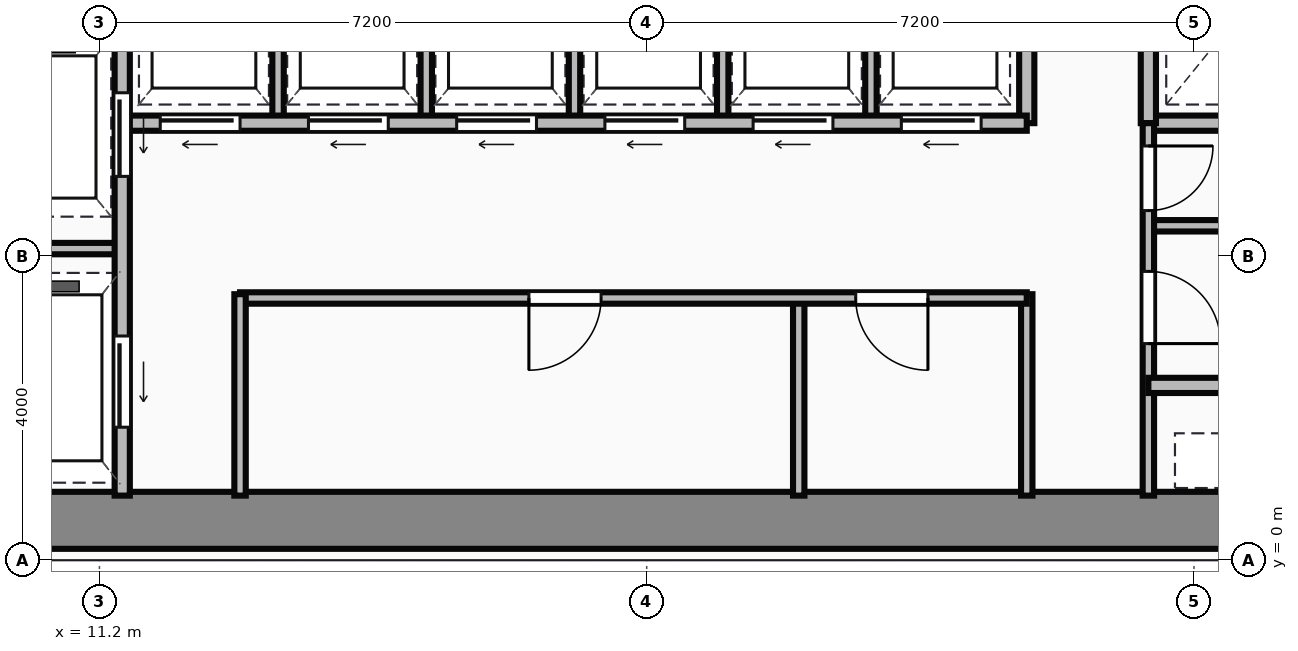
"""IFC4 building model, lengths in metres.
Left out: names, types, materials, properties, quantities, classifications, styles, units other than length and angle.
Written with IfcOpenShell. Run it as: python <this file> out.ifc"""

import sys

from ifc_helpers import new_model, si_unit, direction, frame, frame_2d, origin, place, context, subcontext, project, spatial, rectangle, extrude, source, transform, mapped, element, fill, save


model = new_model("IFC4")
c1 = context("Model", 3, precision=1e-05, world=origin(), true_north=direction((0.0, 1.0)))
c2 = subcontext(c1, "Body", "Model", "MODEL_VIEW")
j1 = project(units=[si_unit("LENGTHUNIT", "METRE"), si_unit("PLANEANGLEUNIT", "RADIAN")], contexts=[c1])
p1 = place(None, origin())
s1 = spatial("IfcSite", under=j1, at=p1, CompositionType="ELEMENT")
p2 = place(p1, origin())
s2 = spatial("IfcBuilding", under=s1, at=p2, CompositionType="ELEMENT")
p3 = place(p2, frame((0.0, 0.0, 121.5)))
s3 = spatial("IfcBuildingStorey", under=s2, at=p3, CompositionType="ELEMENT", Elevation=121.5)
m1 = source(origin(), c2, "Body", "SweptSolid", [
    extrude(rectangle(XDim=29.5, YDim=0.75, at=frame_2d((14.75, 0.0))), origin(), (0.0, 0.0, 1.0), 3.65),
])
p4 = place(p3, frame((4.5, 0.525, 0.0), z_axis=(0.0, 0.0, 1.0), x_axis=(1.0, 0.0, 0.0)))
e1 = element("IfcWall", 1, at=p4, inside=s3, PredefinedType="SHEAR", context=c2, shape_type="MappedRepresentation", body=[
    mapped(m1, transform((0.0, 0.0, 0.0))),
])
m2 = source(origin(), c2, "Body", "SweptSolid", [
    extrude(rectangle(XDim=9.6, YDim=0.2, at=frame_2d((4.8, 0.0))), origin(), (0.0, 0.0, 1.0), 3.4),
])
p5 = place(p3, frame((11.5, 0.85, 0.0), z_axis=(0.0, 0.0, 1.0), x_axis=(0.0, 1.0, 0.0)))
e2 = element("IfcWall", 2, at=p5, inside=s3, PredefinedType="PARTITIONING", context=c2, shape_type="MappedRepresentation", body=[
    mapped(m2, transform((0.0, 0.0, 0.0))),
])
p6 = place(p5, frame((4.2, 0.0, 0.0)))
e3 = element("IfcOpeningElement", 3, at=p6, cuts=e2, PredefinedType="OPENING", context=c2, shape_type="SweptSolid", body=[
    extrude(rectangle(XDim=1.1, YDim=2.15, at=frame_2d((0.55, 1.075))), frame((0.0, 0.11, 0.0), z_axis=(0.0, -1.0, 0.0), x_axis=(1.0, 0.0, 0.0)), (0.0, 0.0, 1.0), 0.22),
])
p7 = place(p5, frame((0.9, 0.0, 0.0)))
e4 = element("IfcOpeningElement", 4, at=p7, cuts=e2, PredefinedType="OPENING", context=c2, shape_type="SweptSolid", body=[
    extrude(rectangle(XDim=1.2, YDim=2.15, at=frame_2d((0.6, 1.075))), frame((0.0, 0.11, 0.0), z_axis=(0.0, -1.0, 0.0), x_axis=(1.0, 0.0, 0.0)), (0.0, 0.0, 1.0), 0.22),
])
m3 = source(origin(), c2, "Body", "SweptSolid", [
    extrude(rectangle(XDim=2.4, YDim=0.15, at=frame_2d((1.2, 0.0))), origin(), (0.0, 0.0, 1.0), 3.4),
])
p8 = place(p3, frame((9.1, 4.1, 0.0), z_axis=(0.0, 0.0, 1.0), x_axis=(1.0, 0.0, 0.0)))
e5 = element("IfcWall", 5, at=p8, inside=s3, PredefinedType="PARTITIONING", context=c2, shape_type="MappedRepresentation", body=[
    mapped(m3, transform((0.0, 0.0, 0.0))),
])
m4 = source(origin(), c2, "Body", "SweptSolid", [
    extrude(rectangle(XDim=2.65, YDim=0.15, at=frame_2d((1.325, 0.0))), origin(), (0.0, 0.0, 1.0), 3.4),
])
p9 = place(p3, frame((13.05, 0.85, 0.0), z_axis=(0.0, 0.0, 1.0), x_axis=(0.0, 1.0, 0.0)))
e6 = element("IfcWall", 6, at=p9, inside=s3, PredefinedType="PARTITIONING", context=c2, shape_type="MappedRepresentation", body=[
    mapped(m4, transform((0.0, 0.0, 0.0))),
])
m5 = source(origin(), c2, "Body", "SweptSolid", [
    extrude(rectangle(XDim=10.35, YDim=0.15, at=frame_2d((5.175, 0.0))), origin(), (0.0, 0.0, 1.0), 3.4),
])
p10 = place(p3, frame((13.05, 3.45, 0.0), z_axis=(0.0, 0.0, 1.0), x_axis=(1.0, 0.0, 0.0)))
e7 = element("IfcWall", 7, at=p10, inside=s3, PredefinedType="PARTITIONING", context=c2, shape_type="MappedRepresentation", body=[
    mapped(m5, transform((0.0, 0.0, 0.0))),
])
p11 = place(p10, frame((3.8, 0.0, 0.0)))
e8 = element("IfcOpeningElement", 8, at=p11, cuts=e7, PredefinedType="OPENING", context=c2, shape_type="SweptSolid", body=[
    extrude(rectangle(XDim=0.95, YDim=2.15, at=frame_2d((0.475, 1.075))), frame((0.0, 0.085, 0.0), z_axis=(0.0, -1.0, 0.0), x_axis=(1.0, 0.0, 0.0)), (0.0, 0.0, 1.0), 0.17),
])
p12 = place(p10, frame((8.1, 0.0, 0.0)))
e9 = element("IfcOpeningElement", 9, at=p12, cuts=e7, PredefinedType="OPENING", context=c2, shape_type="SweptSolid", body=[
    extrude(rectangle(XDim=0.95, YDim=2.15, at=frame_2d((0.475, 1.075))), frame((0.0, 0.085, 0.0), z_axis=(0.0, -1.0, 0.0), x_axis=(1.0, 0.0, 0.0)), (0.0, 0.0, 1.0), 0.17),
])
p13 = place(p3, frame((23.4, 0.85, 0.0), z_axis=(0.0, 0.0, 1.0), x_axis=(0.0, 1.0, 0.0)))
e10 = element("IfcWall", 10, at=p13, inside=s3, PredefinedType="PARTITIONING", context=c2, shape_type="MappedRepresentation", body=[
    mapped(m4, transform((0.0, 0.0, 0.0))),
])
m6 = source(origin(), c2, "Body", "SweptSolid", [
    extrude(rectangle(XDim=2.6, YDim=0.15, at=frame_2d((1.3, 0.0))), origin(), (0.0, 0.0, 1.0), 3.4),
])
p14 = place(p3, frame((20.4, 0.85, 0.0), z_axis=(0.0, 0.0, 1.0), x_axis=(0.0, 1.0, 0.0)))
e11 = element("IfcWall", 11, at=p14, inside=s3, PredefinedType="PARTITIONING", context=c2, shape_type="MappedRepresentation", body=[
    mapped(m6, transform((0.0, 0.0, 0.0))),
])
m7 = source(origin(), c2, "Body", "SweptSolid", [
    extrude(rectangle(XDim=11.85, YDim=0.2, at=frame_2d((5.925, 0.0))), origin(), (0.0, 0.0, 1.0), 3.4),
])
p15 = place(p3, frame((11.55, 5.75, 0.0), z_axis=(0.0, 0.0, 1.0), x_axis=(1.0, 0.0, 0.0)))
e12 = element("IfcWall", 12, at=p15, inside=s3, PredefinedType="PARTITIONING", context=c2, shape_type="MappedRepresentation", body=[
    mapped(m7, transform((0.0, 0.0, 0.0))),
])
p16 = place(p15, frame((0.45, 0.0, 0.0)))
e13 = element("IfcOpeningElement", 13, at=p16, cuts=e12, PredefinedType="OPENING", context=c2, shape_type="SweptSolid", body=[
    extrude(rectangle(XDim=1.05, YDim=2.15, at=frame_2d((0.525, 1.075))), frame((0.0, 0.11, 0.0), z_axis=(0.0, -1.0, 0.0), x_axis=(1.0, 0.0, 0.0)), (0.0, 0.0, 1.0), 0.22),
])
p17 = place(p15, frame((2.4, 0.0, 0.0)))
e14 = element("IfcOpeningElement", 14, at=p17, cuts=e12, PredefinedType="OPENING", context=c2, shape_type="SweptSolid", body=[
    extrude(rectangle(XDim=1.05, YDim=2.15, at=frame_2d((0.525, 1.075))), frame((0.0, 0.11, 0.0), z_axis=(0.0, -1.0, 0.0), x_axis=(1.0, 0.0, 0.0)), (0.0, 0.0, 1.0), 0.22),
])
p18 = place(p15, frame((4.35, 0.0, 0.0)))
e15 = element("IfcOpeningElement", 15, at=p18, cuts=e12, PredefinedType="OPENING", context=c2, shape_type="SweptSolid", body=[
    extrude(rectangle(XDim=1.05, YDim=2.15, at=frame_2d((0.525, 1.075))), frame((0.0, 0.11, 0.0), z_axis=(0.0, -1.0, 0.0), x_axis=(1.0, 0.0, 0.0)), (0.0, 0.0, 1.0), 0.22),
])
p19 = place(p15, frame((6.3, 0.0, 0.0)))
e16 = element("IfcOpeningElement", 16, at=p19, cuts=e12, PredefinedType="OPENING", context=c2, shape_type="SweptSolid", body=[
    extrude(rectangle(XDim=1.05, YDim=2.15, at=frame_2d((0.525, 1.075))), frame((0.0, 0.11, 0.0), z_axis=(0.0, -1.0, 0.0), x_axis=(1.0, 0.0, 0.0)), (0.0, 0.0, 1.0), 0.22),
])
p20 = place(p15, frame((8.25, 0.0, 0.0)))
e17 = element("IfcOpeningElement", 17, at=p20, cuts=e12, PredefinedType="OPENING", context=c2, shape_type="SweptSolid", body=[
    extrude(rectangle(XDim=1.05, YDim=2.15, at=frame_2d((0.525, 1.075))), frame((0.0, 0.11, 0.0), z_axis=(0.0, -1.0, 0.0), x_axis=(1.0, 0.0, 0.0)), (0.0, 0.0, 1.0), 0.22),
])
p21 = place(p15, frame((10.2, 0.0, 0.0)))
e18 = element("IfcOpeningElement", 18, at=p21, cuts=e12, PredefinedType="OPENING", context=c2, shape_type="SweptSolid", body=[
    extrude(rectangle(XDim=1.05, YDim=2.15, at=frame_2d((0.525, 1.075))), frame((0.0, 0.11, 0.0), z_axis=(0.0, -1.0, 0.0), x_axis=(1.0, 0.0, 0.0)), (0.0, 0.0, 1.0), 0.22),
])
m8 = source(origin(), c2, "Body", "SweptSolid", [
    extrude(rectangle(XDim=2.6, YDim=0.2, at=frame_2d((1.3, 0.0))), origin(), (0.0, 0.0, 1.0), 3.4),
])
p22 = place(p3, frame((23.4, 5.75, 0.0), z_axis=(0.0, 0.0, 1.0), x_axis=(0.0, 1.0, 0.0)))
e19 = element("IfcWall", 19, at=p22, inside=s3, PredefinedType="PARTITIONING", context=c2, shape_type="MappedRepresentation", body=[
    mapped(m8, transform((0.0, 0.0, 0.0))),
])
m9 = source(origin(), c2, "Body", "SweptSolid", [
    extrude(rectangle(XDim=2.5, YDim=0.15, at=frame_2d((1.25, 0.0))), origin(), (0.0, 0.0, 1.0), 3.4),
])
for number, where, z_axis, x_axis in (
    (20, (13.55, 5.8, 0.0), (0.0, 0.0, 1.0), (0.0, 1.0, 0.0)),
    (21, (15.5, 5.8, 0.0), (0.0, 0.0, 1.0), (0.0, 1.0, 0.0)),
    (22, (17.45, 5.8, 0.0), (0.0, 0.0, 1.0), (0.0, 1.0, 0.0)),
    (23, (19.4, 5.8, 0.0), (0.0, 0.0, 1.0), (0.0, 1.0, 0.0)),
    (24, (21.35, 5.8, 0.0), (0.0, 0.0, 1.0), (0.0, 1.0, 0.0)),
):
    element("IfcWall", number, at=place(p3, frame(where, z_axis=z_axis, x_axis=x_axis)), inside=s3, PredefinedType="PARTITIONING", context=c2, shape_type="MappedRepresentation", body=[
        mapped(m9, transform((0.0, 0.0, 0.0))),
    ])
m10 = source(origin(), c2, "Body", "SweptSolid", [
    extrude(rectangle(XDim=4.55, YDim=0.2, at=frame_2d((2.275, 0.0))), origin(), (0.0, 0.0, 1.0), 3.4),
])
p23 = place(p3, frame((25.0, 5.75, 0.0), z_axis=(0.0, 0.0, 1.0), x_axis=(1.0, 0.0, 0.0)))
e25 = element("IfcWall", 25, at=p23, inside=s3, PredefinedType="PARTITIONING", context=c2, shape_type="MappedRepresentation", body=[
    mapped(m10, transform((0.0, 0.0, 0.0))),
])
p24 = place(p3, frame((25.0, 5.75, 0.0), z_axis=(0.0, 0.0, 1.0), x_axis=(0.0, 1.0, 0.0)))
e26 = element("IfcWall", 26, at=p24, inside=s3, PredefinedType="PARTITIONING", context=c2, shape_type="MappedRepresentation", body=[
    mapped(m8, transform((0.0, 0.0, 0.0))),
])
m11 = source(origin(), c2, "Body", "SweptSolid", [
    extrude(rectangle(XDim=4.9, YDim=0.15, at=frame_2d((2.45, 0.0))), origin(), (0.0, 0.0, 1.0), 3.4),
])
p25 = place(p3, frame((25.0, 0.85, 0.0), z_axis=(0.0, 0.0, 1.0), x_axis=(0.0, 1.0, 0.0)))
e27 = element("IfcWall", 27, at=p25, inside=s3, PredefinedType="PARTITIONING", context=c2, shape_type="MappedRepresentation", body=[
    mapped(m11, transform((0.0, 0.0, 0.0))),
])
p26 = place(p25, frame((2.0, 0.0, 0.0)))
e28 = element("IfcOpeningElement", 28, at=p26, cuts=e27, PredefinedType="OPENING", context=c2, shape_type="SweptSolid", body=[
    extrude(rectangle(XDim=0.95, YDim=2.15, at=frame_2d((0.475, 1.075))), frame((0.0, 0.085, 0.0), z_axis=(0.0, -1.0, 0.0), x_axis=(1.0, 0.0, 0.0)), (0.0, 0.0, 1.0), 0.17),
])
p27 = place(p25, frame((3.75, 0.0, 0.0)))
e29 = element("IfcOpeningElement", 29, at=p27, cuts=e27, PredefinedType="OPENING", context=c2, shape_type="SweptSolid", body=[
    extrude(rectangle(XDim=0.85, YDim=2.15, at=frame_2d((0.425, 1.075))), frame((0.0, 0.085, 0.0), z_axis=(0.0, -1.0, 0.0), x_axis=(1.0, 0.0, 0.0)), (0.0, 0.0, 1.0), 0.17),
])
m12 = source(origin(), c2, "Body", "SweptSolid", [
    extrude(rectangle(XDim=2.4, YDim=0.2, at=frame_2d((1.2, 0.0))), origin(), (0.0, 0.0, 1.0), 3.4),
])
p28 = place(p3, frame((25.0, 2.3, 0.0), z_axis=(0.0, 0.0, 1.0), x_axis=(1.0, 0.0, 0.0)))
e30 = element("IfcWall", 30, at=p28, inside=s3, PredefinedType="PARTITIONING", context=c2, shape_type="MappedRepresentation", body=[
    mapped(m12, transform((0.0, 0.0, 0.0))),
])
m13 = source(origin(), c2, "Body", "SweptSolid", [
    extrude(rectangle(XDim=4.55, YDim=0.15, at=frame_2d((2.275, 0.0))), origin(), (0.0, 0.0, 1.0), 3.4),
])
p29 = place(p3, frame((25.0, 4.4, 0.0), z_axis=(0.0, 0.0, 1.0), x_axis=(1.0, 0.0, 0.0)))
e31 = element("IfcWall", 31, at=p29, inside=s3, PredefinedType="PARTITIONING", context=c2, shape_type="MappedRepresentation", body=[
    mapped(m13, transform((0.0, 0.0, 0.0))),
])
m14 = source(origin(), c2, "Body", "SweptSolid", [
    extrude(rectangle(XDim=1.1, YDim=2.15, at=frame_2d((0.55, 1.075))), frame((0.0, 0.025, 0.0), z_axis=(0.0, -1.0, 0.0), x_axis=(1.0, 0.0, 0.0)), (0.0, 0.0, 1.0), 0.05),
])
p30 = place(p6, frame((1.1, 0.0, 0.0), z_axis=(0.0, 0.0, 1.0), x_axis=(-1.0, 0.0, 0.0)))
e32 = element("IfcDoor", 32, at=p30, inside=s3, OperationType="SLIDING_TO_LEFT", PredefinedType="DOOR", context=c2, shape_type="MappedRepresentation", body=[
    mapped(m14, transform((0.0, 0.0, 0.0))),
])
fill(e3, e32)
m15 = source(origin(), c2, "Body", "SweptSolid", [
    extrude(rectangle(XDim=1.2, YDim=2.15, at=frame_2d((0.6, 1.075))), frame((0.0, 0.025, 0.0), z_axis=(0.0, -1.0, 0.0), x_axis=(1.0, 0.0, 0.0)), (0.0, 0.0, 1.0), 0.05),
])
p31 = place(p7, frame((1.2, 0.0, 0.0), z_axis=(0.0, 0.0, 1.0), x_axis=(-1.0, 0.0, 0.0)))
e33 = element("IfcDoor", 33, at=p31, inside=s3, OperationType="SLIDING_TO_LEFT", PredefinedType="DOOR", context=c2, shape_type="MappedRepresentation", body=[
    mapped(m15, transform((0.0, 0.0, 0.0))),
])
fill(e4, e33)
m16 = source(origin(), c2, "Body", "SweptSolid", [
    extrude(rectangle(XDim=0.95, YDim=2.15, at=frame_2d((0.475, 1.075))), frame((0.0, 0.025, 0.0), z_axis=(0.0, -1.0, 0.0), x_axis=(1.0, 0.0, 0.0)), (0.0, 0.0, 1.0), 0.05),
])
p32 = place(p11, origin())
e34 = element("IfcDoor", 34, at=p32, inside=s3, OperationType="SINGLE_SWING_LEFT", PredefinedType="DOOR", context=c2, shape_type="MappedRepresentation", body=[
    mapped(m16, transform((0.0, 0.0, 0.0))),
])
fill(e8, e34)
p33 = place(p12, origin())
e35 = element("IfcDoor", 35, at=p33, inside=s3, OperationType="SINGLE_SWING_RIGHT", PredefinedType="DOOR", context=c2, shape_type="MappedRepresentation", body=[
    mapped(m16, transform((0.0, 0.0, 0.0))),
])
fill(e9, e35)
m17 = source(origin(), c2, "Body", "SweptSolid", [
    extrude(rectangle(XDim=1.05, YDim=2.15, at=frame_2d((0.525, 1.075))), frame((0.0, 0.025, 0.0), z_axis=(0.0, -1.0, 0.0), x_axis=(1.0, 0.0, 0.0)), (0.0, 0.0, 1.0), 0.05),
])
p34 = place(p16, frame((1.05, 0.0, 0.0), z_axis=(0.0, 0.0, 1.0), x_axis=(-1.0, 0.0, 0.0)))
e36 = element("IfcDoor", 36, at=p34, inside=s3, OperationType="SLIDING_TO_LEFT", PredefinedType="DOOR", context=c2, shape_type="MappedRepresentation", body=[
    mapped(m17, transform((0.0, 0.0, 0.0))),
])
fill(e13, e36)
p35 = place(p17, frame((1.05, 0.0, 0.0), z_axis=(0.0, 0.0, 1.0), x_axis=(-1.0, 0.0, 0.0)))
e37 = element("IfcDoor", 37, at=p35, inside=s3, OperationType="SLIDING_TO_LEFT", PredefinedType="DOOR", context=c2, shape_type="MappedRepresentation", body=[
    mapped(m17, transform((0.0, 0.0, 0.0))),
])
fill(e14, e37)
p36 = place(p18, frame((1.05, 0.0, 0.0), z_axis=(0.0, 0.0, 1.0), x_axis=(-1.0, 0.0, 0.0)))
e38 = element("IfcDoor", 38, at=p36, inside=s3, OperationType="SLIDING_TO_LEFT", PredefinedType="DOOR", context=c2, shape_type="MappedRepresentation", body=[
    mapped(m17, transform((0.0, 0.0, 0.0))),
])
fill(e15, e38)
p37 = place(p19, frame((1.05, 0.0, 0.0), z_axis=(0.0, 0.0, 1.0), x_axis=(-1.0, 0.0, 0.0)))
e39 = element("IfcDoor", 39, at=p37, inside=s3, OperationType="SLIDING_TO_LEFT", PredefinedType="DOOR", context=c2, shape_type="MappedRepresentation", body=[
    mapped(m17, transform((0.0, 0.0, 0.0))),
])
fill(e16, e39)
p38 = place(p20, frame((1.05, 0.0, 0.0), z_axis=(0.0, 0.0, 1.0), x_axis=(-1.0, 0.0, 0.0)))
e40 = element("IfcDoor", 40, at=p38, inside=s3, OperationType="SLIDING_TO_LEFT", PredefinedType="DOOR", context=c2, shape_type="MappedRepresentation", body=[
    mapped(m17, transform((0.0, 0.0, 0.0))),
])
fill(e17, e40)
p39 = place(p21, frame((1.05, 0.0, 0.0), z_axis=(0.0, 0.0, 1.0), x_axis=(-1.0, 0.0, 0.0)))
e41 = element("IfcDoor", 41, at=p39, inside=s3, OperationType="SLIDING_TO_LEFT", PredefinedType="DOOR", context=c2, shape_type="MappedRepresentation", body=[
    mapped(m17, transform((0.0, 0.0, 0.0))),
])
fill(e18, e41)
p40 = place(p26, origin())
e42 = element("IfcDoor", 42, at=p40, inside=s3, OperationType="SINGLE_SWING_LEFT", PredefinedType="DOOR", context=c2, shape_type="MappedRepresentation", body=[
    mapped(m16, transform((0.0, 0.0, 0.0))),
])
fill(e28, e42)
m18 = source(origin(), c2, "Body", "SweptSolid", [
    extrude(rectangle(XDim=0.85, YDim=2.15, at=frame_2d((0.425, 1.075))), frame((0.0, 0.025, 0.0), z_axis=(0.0, -1.0, 0.0), x_axis=(1.0, 0.0, 0.0)), (0.0, 0.0, 1.0), 0.05),
])
p41 = place(p27, origin())
e43 = element("IfcDoor", 43, at=p41, inside=s3, OperationType="SINGLE_SWING_RIGHT", PredefinedType="DOOR", context=c2, shape_type="MappedRepresentation", body=[
    mapped(m18, transform((0.0, 0.0, 0.0))),
])
fill(e29, e43)
save(model, sys.argv[1])
